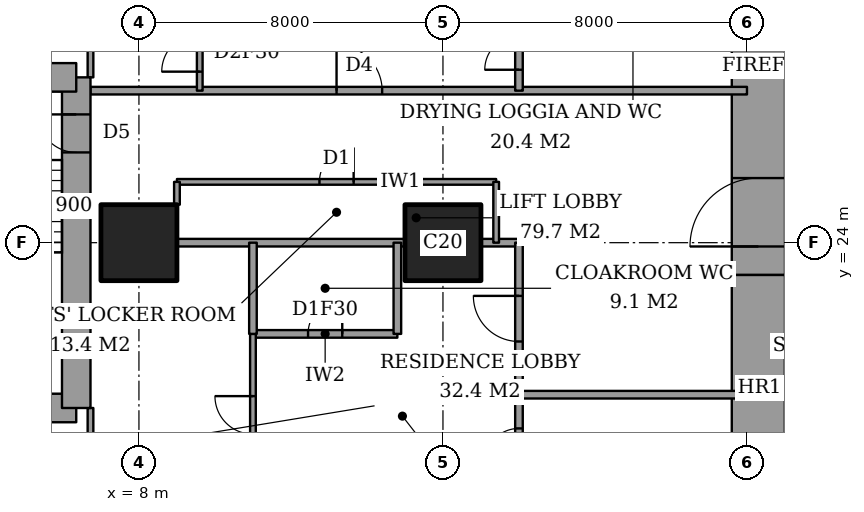
"""IFC4 building model, lengths in metres.
Left out: names, types, materials, properties, quantities, classifications, styles, units other than length and angle.
Written with IfcOpenShell. Run it as: python <this file> out.ifc"""

import sys

from ifc_helpers import new_model, si_unit, direction, frame, frame_2d, origin, origin_2d, place, context, subcontext, project, spatial, rectangle, extrude, element, fill, save


model = new_model("IFC4")
c1 = context("Model", 3, precision=1e-05, world=origin(), true_north=direction((0.0, 1.0)))
c2 = subcontext(c1, "Body", "Model", "MODEL_VIEW")
j1 = project(units=[si_unit("LENGTHUNIT", "METRE"), si_unit("PLANEANGLEUNIT", "RADIAN")], contexts=[c1])
p1 = place(None, origin())
s1 = spatial("IfcSite", under=j1, at=p1, CompositionType="ELEMENT")
p2 = place(p1, origin())
s2 = spatial("IfcBuilding", under=s1, at=p2, CompositionType="ELEMENT")
p3 = place(p2, frame((0.0, 0.0, 72.8)))
s3 = spatial("IfcBuildingStorey", under=s2, at=p3, CompositionType="ELEMENT", Elevation=72.8)
for number, where, z_axis, x_axis in (
    (1, (8.0, 24.0, 0.0), (0.0, 0.0, 1.0), (1.0, 0.0, 0.0)),
    (2, (16.0, 24.0, 0.0), (0.0, 0.0, 1.0), (1.0, 0.0, 0.0)),
):
    element("IfcColumn", number, at=place(p3, frame(where, z_axis=z_axis, x_axis=x_axis)), inside=s3, PredefinedType="COLUMN", context=c2, shape_type="SweptSolid", body=[
        extrude(rectangle(XDim=2.0, YDim=2.0, at=origin_2d()), origin(), (0.0, 0.0, 1.0), 3.6),
    ])
p4 = place(p3, frame((24.3, 13.0, 0.0), z_axis=(0.0, 0.0, 1.0), x_axis=(0.0, 1.0, 0.0)))
e3 = element("IfcWall", 3, at=p4, inside=s3, PredefinedType="SHEAR", context=c2, shape_type="SweptSolid", body=[
    extrude(rectangle(XDim=10.15, YDim=1.4, at=frame_2d((5.075, 0.0))), origin(), (0.0, 0.0, 1.0), 3.6),
])
p5 = place(p3, frame((24.3, 23.15, 0.0), z_axis=(0.0, 0.0, 1.0), x_axis=(0.0, 1.0, 0.0)))
e4 = element("IfcWall", 4, at=p5, inside=s3, PredefinedType="SHEAR", context=c2, shape_type="SweptSolid", body=[
    extrude(rectangle(XDim=11.85, YDim=1.4, at=frame_2d((5.925, 0.0))), origin(), (0.0, 0.0, 1.0), 3.6),
])
p6 = place(p5, frame((0.75, 0.0, 0.0)))
e5 = element("IfcOpeningElement", 5, at=p6, cuts=e4, PredefinedType="OPENING", context=c2, shape_type="SweptSolid", body=[
    extrude(rectangle(XDim=1.8, YDim=2.4, at=frame_2d((0.9, 1.2))), frame((0.0, 0.71, 0.0), z_axis=(0.0, -1.0, 0.0), x_axis=(1.0, 0.0, 0.0)), (0.0, 0.0, 1.0), 1.42),
])
p7 = place(p3, frame((1.9, 19.65, 0.0), z_axis=(0.0, 0.0, 1.0), x_axis=(1.0, 0.0, 0.0)))
e6 = element("IfcWall", 6, at=p7, inside=s3, PredefinedType="SHEAR", context=c2, shape_type="SweptSolid", body=[
    extrude(rectangle(XDim=4.45, YDim=0.75, at=frame_2d((2.225, 0.0))), origin(), (0.0, 0.0, 1.0), 3.6),
])
p8 = place(p3, frame((6.35, 19.65, 0.0), z_axis=(0.0, 0.0, 1.0), x_axis=(0.0, 1.0, 0.0)))
e7 = element("IfcWall", 7, at=p8, inside=s3, PredefinedType="SHEAR", context=c2, shape_type="SweptSolid", body=[
    extrude(rectangle(XDim=8.7, YDim=0.75, at=frame_2d((4.35, 0.0))), origin(), (0.0, 0.0, 1.0), 3.6),
])
p9 = place(p8, frame((6.725, 0.0, 0.0)))
e8 = element("IfcOpeningElement", 8, at=p9, cuts=e7, PredefinedType="OPENING", context=c2, shape_type="SweptSolid", body=[
    extrude(rectangle(XDim=1.0, YDim=2.1, at=frame_2d((0.5, 1.05))), frame((0.0, 0.385, 0.0), z_axis=(0.0, -1.0, 0.0), x_axis=(1.0, 0.0, 0.0)), (0.0, 0.0, 1.0), 0.77),
])
p10 = place(p3, frame((6.35, 28.35, 0.0), z_axis=(0.0, 0.0, 1.0), x_axis=(-1.0, 0.0, 0.0)))
e9 = element("IfcWall", 9, at=p10, inside=s3, PredefinedType="SHEAR", context=c2, shape_type="SweptSolid", body=[
    extrude(rectangle(XDim=4.45, YDim=0.75, at=frame_2d((2.225, 0.0))), origin(), (0.0, 0.0, 1.0), 3.6),
])
p11 = place(p3, frame((18.0, 20.0, 0.0), z_axis=(0.0, 0.0, 1.0), x_axis=(1.0, 0.0, 0.0)))
e10 = element("IfcWall", 10, at=p11, inside=s3, PredefinedType="PARTITIONING", context=c2, shape_type="SweptSolid", body=[
    extrude(rectangle(XDim=6.0, YDim=0.2, at=frame_2d((3.0, 0.0))), origin(), (0.0, 0.0, 1.0), 3.35),
])
p12 = place(p3, frame((11.0, 21.6, 0.0), z_axis=(0.0, 0.0, 1.0), x_axis=(1.0, 0.0, 0.0)))
e11 = element("IfcWall", 11, at=p12, inside=s3, PredefinedType="PARTITIONING", context=c2, shape_type="SweptSolid", body=[
    extrude(rectangle(XDim=3.8, YDim=0.2, at=frame_2d((1.9, 0.0))), origin(), (0.0, 0.0, 1.0), 3.35),
])
p13 = place(p12, frame((1.45, 0.0, 0.0)))
e12 = element("IfcOpeningElement", 12, at=p13, cuts=e11, PredefinedType="OPENING", context=c2, shape_type="SweptSolid", body=[
    extrude(rectangle(XDim=0.9, YDim=2.1, at=frame_2d((0.45, 1.05))), frame((0.0, 0.11, 0.0), z_axis=(0.0, -1.0, 0.0), x_axis=(1.0, 0.0, 0.0)), (0.0, 0.0, 1.0), 0.22),
])
p14 = place(p3, frame((9.0, 24.0, 0.0), z_axis=(0.0, 0.0, 1.0), x_axis=(1.0, 0.0, 0.0)))
e13 = element("IfcWall", 13, at=p14, inside=s3, PredefinedType="PARTITIONING", context=c2, shape_type="SweptSolid", body=[
    extrude(rectangle(XDim=6.0, YDim=0.2, at=frame_2d((3.0, 0.0))), origin(), (0.0, 0.0, 1.0), 3.35),
])
p15 = place(p3, frame((17.0, 24.0, 0.0), z_axis=(0.0, 0.0, 1.0), x_axis=(1.0, 0.0, 0.0)))
e14 = element("IfcWall", 14, at=p15, inside=s3, PredefinedType="PARTITIONING", context=c2, shape_type="SweptSolid", body=[
    extrude(rectangle(XDim=1.0, YDim=0.2, at=frame_2d((0.5, 0.0))), origin(), (0.0, 0.0, 1.0), 3.35),
])
p16 = place(p3, frame((9.0, 25.6, 0.0), z_axis=(0.0, 0.0, 1.0), x_axis=(1.0, 0.0, 0.0)))
e15 = element("IfcWall", 15, at=p16, inside=s3, PredefinedType="PARTITIONING", context=c2, shape_type="SweptSolid", body=[
    extrude(rectangle(XDim=8.4, YDim=0.15, at=frame_2d((4.2, 0.0))), origin(), (0.0, 0.0, 1.0), 3.35),
])
p17 = place(p16, frame((3.75, 0.0, 0.0)))
e16 = element("IfcOpeningElement", 16, at=p17, cuts=e15, PredefinedType="OPENING", context=c2, shape_type="SweptSolid", body=[
    extrude(rectangle(XDim=0.9, YDim=2.1, at=frame_2d((0.45, 1.05))), frame((0.0, 0.085, 0.0), z_axis=(0.0, -1.0, 0.0), x_axis=(1.0, 0.0, 0.0)), (0.0, 0.0, 1.0), 0.17),
])
p18 = place(p3, frame((6.725, 28.0, 0.0), z_axis=(0.0, 0.0, 1.0), x_axis=(1.0, 0.0, 0.0)))
e17 = element("IfcWall", 17, at=p18, inside=s3, PredefinedType="PARTITIONING", context=c2, shape_type="SweptSolid", body=[
    extrude(rectangle(XDim=17.275, YDim=0.2, at=frame_2d((8.637, 0.0))), origin(), (0.0, 0.0, 1.0), 3.35),
])
p19 = place(p18, frame((6.475, 0.0, 0.0)))
e18 = element("IfcOpeningElement", 18, at=p19, cuts=e17, PredefinedType="OPENING", context=c2, shape_type="SweptSolid", body=[
    extrude(rectangle(XDim=1.2, YDim=2.4, at=frame_2d((0.6, 1.2))), frame((0.0, 0.11, 0.0), z_axis=(0.0, -1.0, 0.0), x_axis=(1.0, 0.0, 0.0)), (0.0, 0.0, 1.0), 0.22),
])
p20 = place(p3, frame((6.725, 17.2, 0.0), z_axis=(0.0, 0.0, 1.0), x_axis=(0.0, 1.0, 0.0)))
e19 = element("IfcWall", 19, at=p20, inside=s3, PredefinedType="PARTITIONING", context=c2, shape_type="SweptSolid", body=[
    extrude(rectangle(XDim=2.45, YDim=0.15, at=frame_2d((1.225, 0.0))), origin(), (0.0, 0.0, 1.0), 3.35),
])
p21 = place(p20, frame((0.587, 0.0, 0.0)))
e20 = element("IfcOpeningElement", 20, at=p21, cuts=e19, PredefinedType="OPENING", context=c2, shape_type="SweptSolid", body=[
    extrude(rectangle(XDim=0.9, YDim=2.1, at=frame_2d((0.45, 1.05))), frame((0.0, 0.085, 0.0), z_axis=(0.0, -1.0, 0.0), x_axis=(1.0, 0.0, 0.0)), (0.0, 0.0, 1.0), 0.17),
])
p22 = place(p3, frame((6.725, 28.35, 0.0), z_axis=(0.0, 0.0, 1.0), x_axis=(0.0, 1.0, 0.0)))
e21 = element("IfcWall", 21, at=p22, inside=s3, PredefinedType="PARTITIONING", context=c2, shape_type="SweptSolid", body=[
    extrude(rectangle(XDim=2.45, YDim=0.15, at=frame_2d((1.225, 0.0))), origin(), (0.0, 0.0, 1.0), 3.35),
])
p23 = place(p22, frame((0.913, 0.0, 0.0)))
e22 = element("IfcOpeningElement", 22, at=p23, cuts=e21, PredefinedType="OPENING", context=c2, shape_type="SweptSolid", body=[
    extrude(rectangle(XDim=1.0, YDim=2.1, at=frame_2d((0.5, 1.05))), frame((0.0, 0.085, 0.0), z_axis=(0.0, -1.0, 0.0), x_axis=(1.0, 0.0, 0.0)), (0.0, 0.0, 1.0), 0.17),
])
p24 = place(p3, frame((9.0, 25.0, 0.0), z_axis=(0.0, 0.0, 1.0), x_axis=(0.0, 1.0, 0.0)))
e23 = element("IfcWall", 23, at=p24, inside=s3, PredefinedType="PARTITIONING", context=c2, shape_type="SweptSolid", body=[
    extrude(rectangle(XDim=0.6, YDim=0.15, at=frame_2d((0.3, 0.0))), origin(), (0.0, 0.0, 1.0), 3.35),
])
p25 = place(p3, frame((9.6, 28.0, 0.0), z_axis=(0.0, 0.0, 1.0), x_axis=(0.0, 1.0, 0.0)))
e24 = element("IfcWall", 24, at=p25, inside=s3, PredefinedType="PARTITIONING", context=c2, shape_type="SweptSolid", body=[
    extrude(rectangle(XDim=9.4, YDim=0.15, at=frame_2d((4.7, 0.0))), origin(), (0.0, 0.0, 1.0), 3.35),
])
p26 = place(p25, frame((0.5, 0.0, 0.0)))
e25 = element("IfcOpeningElement", 25, at=p26, cuts=e24, PredefinedType="OPENING", context=c2, shape_type="SweptSolid", body=[
    extrude(rectangle(XDim=1.0, YDim=2.1, at=frame_2d((0.5, 1.05))), frame((0.0, 0.085, 0.0), z_axis=(0.0, -1.0, 0.0), x_axis=(1.0, 0.0, 0.0)), (0.0, 0.0, 1.0), 0.17),
])
p27 = place(p3, frame((11.0, 21.6, 0.0), z_axis=(0.0, 0.0, 1.0), x_axis=(0.0, 1.0, 0.0)))
e26 = element("IfcWall", 26, at=p27, inside=s3, PredefinedType="PARTITIONING", context=c2, shape_type="SweptSolid", body=[
    extrude(rectangle(XDim=2.4, YDim=0.2, at=frame_2d((1.2, 0.0))), origin(), (0.0, 0.0, 1.0), 3.35),
])
p28 = place(p3, frame((11.0, 11.0, 0.0), z_axis=(0.0, 0.0, 1.0), x_axis=(0.0, 1.0, 0.0)))
e27 = element("IfcWall", 27, at=p28, inside=s3, PredefinedType="PARTITIONING", context=c2, shape_type="SweptSolid", body=[
    extrude(rectangle(XDim=10.6, YDim=0.15, at=frame_2d((5.3, 0.0))), origin(), (0.0, 0.0, 1.0), 3.35),
])
p29 = place(p28, frame((7.962, 0.0, 0.0)))
e28 = element("IfcOpeningElement", 28, at=p29, cuts=e27, PredefinedType="OPENING", context=c2, shape_type="SweptSolid", body=[
    extrude(rectangle(XDim=1.0, YDim=2.1, at=frame_2d((0.5, 1.05))), frame((0.0, 0.085, 0.0), z_axis=(0.0, -1.0, 0.0), x_axis=(1.0, 0.0, 0.0)), (0.0, 0.0, 1.0), 0.17),
])
p30 = place(p3, frame((14.8, 21.6, 0.0), z_axis=(0.0, 0.0, 1.0), x_axis=(0.0, 1.0, 0.0)))
e29 = element("IfcWall", 29, at=p30, inside=s3, PredefinedType="PARTITIONING", context=c2, shape_type="SweptSolid", body=[
    extrude(rectangle(XDim=2.4, YDim=0.2, at=frame_2d((1.2, 0.0))), origin(), (0.0, 0.0, 1.0), 3.35),
])
p31 = place(p3, frame((17.4, 24.0, 0.0), z_axis=(0.0, 0.0, 1.0), x_axis=(0.0, 1.0, 0.0)))
e30 = element("IfcWall", 30, at=p31, inside=s3, PredefinedType="PARTITIONING", context=c2, shape_type="SweptSolid", body=[
    extrude(rectangle(XDim=1.6, YDim=0.15, at=frame_2d((0.8, 0.0))), origin(), (0.0, 0.0, 1.0), 3.35),
])
p32 = place(p3, frame((18.0, 17.325, 0.0), z_axis=(0.0, 0.0, 1.0), x_axis=(0.0, 1.0, 0.0)))
e31 = element("IfcWall", 31, at=p32, inside=s3, PredefinedType="PARTITIONING", context=c2, shape_type="SweptSolid", body=[
    extrude(rectangle(XDim=6.675, YDim=0.2, at=frame_2d((3.337, 0.0))), origin(), (0.0, 0.0, 1.0), 3.35),
])
p33 = place(p32, frame((4.075, 0.0, 0.0)))
e32 = element("IfcOpeningElement", 32, at=p33, cuts=e31, PredefinedType="OPENING", context=c2, shape_type="SweptSolid", body=[
    extrude(rectangle(XDim=1.2, YDim=2.4, at=frame_2d((0.6, 1.2))), frame((0.0, 0.11, 0.0), z_axis=(0.0, -1.0, 0.0), x_axis=(1.0, 0.0, 0.0)), (0.0, 0.0, 1.0), 0.22),
])
p34 = place(p32, frame((0.887, 0.0, 0.0)))
e33 = element("IfcOpeningElement", 33, at=p34, cuts=e31, PredefinedType="OPENING", context=c2, shape_type="SweptSolid", body=[
    extrude(rectangle(XDim=0.9, YDim=2.1, at=frame_2d((0.45, 1.05))), frame((0.0, 0.11, 0.0), z_axis=(0.0, -1.0, 0.0), x_axis=(1.0, 0.0, 0.0)), (0.0, 0.0, 1.0), 0.22),
])
p35 = place(p3, frame((18.0, 28.0, 0.0), z_axis=(0.0, 0.0, 1.0), x_axis=(0.0, 1.0, 0.0)))
e34 = element("IfcWall", 34, at=p35, inside=s3, PredefinedType="PARTITIONING", context=c2, shape_type="SweptSolid", body=[
    extrude(rectangle(XDim=3.4, YDim=0.2, at=frame_2d((1.7, 0.0))), origin(), (0.0, 0.0, 1.0), 3.35),
])
p36 = place(p35, frame((0.55, 0.0, 0.0)))
e35 = element("IfcOpeningElement", 35, at=p36, cuts=e34, PredefinedType="OPENING", context=c2, shape_type="SweptSolid", body=[
    extrude(rectangle(XDim=0.9, YDim=2.1, at=frame_2d((0.45, 1.05))), frame((0.0, 0.11, 0.0), z_axis=(0.0, -1.0, 0.0), x_axis=(1.0, 0.0, 0.0)), (0.0, 0.0, 1.0), 0.22),
])
p37 = place(p29, origin())
e36 = element("IfcDoor", 36, at=p37, inside=s3, OperationType="SINGLE_SWING_LEFT", PredefinedType="DOOR", context=c2, shape_type="SweptSolid", body=[
    extrude(rectangle(XDim=1.0, YDim=2.1, at=frame_2d((0.5, 1.05))), frame((0.0, 0.025, 0.0), z_axis=(0.0, -1.0, 0.0), x_axis=(1.0, 0.0, 0.0)), (0.0, 0.0, 1.0), 0.05),
])
fill(e28, e36)
p38 = place(p13, origin())
e37 = element("IfcDoor", 37, at=p38, inside=s3, OperationType="SINGLE_SWING_LEFT", PredefinedType="DOOR", context=c2, shape_type="SweptSolid", body=[
    extrude(rectangle(XDim=0.9, YDim=2.1, at=frame_2d((0.45, 1.05))), frame((0.0, 0.025, 0.0), z_axis=(0.0, -1.0, 0.0), x_axis=(1.0, 0.0, 0.0)), (0.0, 0.0, 1.0), 0.05),
])
fill(e12, e37)
p39 = place(p33, origin())
e38 = element("IfcDoor", 38, at=p39, inside=s3, OperationType="SINGLE_SWING_LEFT", PredefinedType="DOOR", context=c2, shape_type="SweptSolid", body=[
    extrude(rectangle(XDim=1.2, YDim=2.4, at=frame_2d((0.6, 1.2))), frame((0.0, 0.025, 0.0), z_axis=(0.0, -1.0, 0.0), x_axis=(1.0, 0.0, 0.0)), (0.0, 0.0, 1.0), 0.05),
])
fill(e32, e38)
p40 = place(p34, origin())
e39 = element("IfcDoor", 39, at=p40, inside=s3, OperationType="SINGLE_SWING_RIGHT", PredefinedType="DOOR", context=c2, shape_type="SweptSolid", body=[
    extrude(rectangle(XDim=0.9, YDim=2.1, at=frame_2d((0.45, 1.05))), frame((0.0, 0.025, 0.0), z_axis=(0.0, -1.0, 0.0), x_axis=(1.0, 0.0, 0.0)), (0.0, 0.0, 1.0), 0.05),
])
fill(e33, e39)
p41 = place(p26, origin())
e40 = element("IfcDoor", 40, at=p41, inside=s3, OperationType="SINGLE_SWING_RIGHT", PredefinedType="DOOR", context=c2, shape_type="SweptSolid", body=[
    extrude(rectangle(XDim=1.0, YDim=2.1, at=frame_2d((0.5, 1.05))), frame((0.0, 0.025, 0.0), z_axis=(0.0, -1.0, 0.0), x_axis=(1.0, 0.0, 0.0)), (0.0, 0.0, 1.0), 0.05),
])
fill(e25, e40)
p42 = place(p19, origin())
e41 = element("IfcDoor", 41, at=p42, inside=s3, OperationType="SINGLE_SWING_RIGHT", PredefinedType="DOOR", context=c2, shape_type="SweptSolid", body=[
    extrude(rectangle(XDim=1.2, YDim=2.4, at=frame_2d((0.6, 1.2))), frame((0.0, 0.025, 0.0), z_axis=(0.0, -1.0, 0.0), x_axis=(1.0, 0.0, 0.0)), (0.0, 0.0, 1.0), 0.05),
])
fill(e18, e41)
p43 = place(p36, origin())
e42 = element("IfcDoor", 42, at=p43, inside=s3, OperationType="SINGLE_SWING_RIGHT", PredefinedType="DOOR", context=c2, shape_type="SweptSolid", body=[
    extrude(rectangle(XDim=0.9, YDim=2.1, at=frame_2d((0.45, 1.05))), frame((0.0, 0.025, 0.0), z_axis=(0.0, -1.0, 0.0), x_axis=(1.0, 0.0, 0.0)), (0.0, 0.0, 1.0), 0.05),
])
fill(e35, e42)
p44 = place(p17, origin())
e43 = element("IfcDoor", 43, at=p44, inside=s3, OperationType="SINGLE_SWING_LEFT", PredefinedType="DOOR", context=c2, shape_type="SweptSolid", body=[
    extrude(rectangle(XDim=0.9, YDim=2.1, at=frame_2d((0.45, 1.05))), frame((0.0, 0.025, 0.0), z_axis=(0.0, -1.0, 0.0), x_axis=(1.0, 0.0, 0.0)), (0.0, 0.0, 1.0), 0.05),
])
fill(e16, e43)
p45 = place(p6, origin())
e44 = element("IfcDoor", 44, at=p45, inside=s3, OperationType="DOUBLE_DOOR_DOUBLE_SWING", PredefinedType="DOOR", context=c2, shape_type="SweptSolid", body=[
    extrude(rectangle(XDim=1.8, YDim=2.4, at=frame_2d((0.9, 1.2))), frame((0.0, 0.025, 0.0), z_axis=(0.0, -1.0, 0.0), x_axis=(1.0, 0.0, 0.0)), (0.0, 0.0, 1.0), 0.05),
])
fill(e5, e44)
p46 = place(p9, origin())
e45 = element("IfcDoor", 45, at=p46, inside=s3, OperationType="SINGLE_SWING_LEFT", PredefinedType="DOOR", context=c2, shape_type="SweptSolid", body=[
    extrude(rectangle(XDim=1.0, YDim=2.1, at=frame_2d((0.5, 1.05))), frame((0.0, 0.025, 0.0), z_axis=(0.0, -1.0, 0.0), x_axis=(1.0, 0.0, 0.0)), (0.0, 0.0, 1.0), 0.05),
])
fill(e8, e45)
save(model, sys.argv[1])
